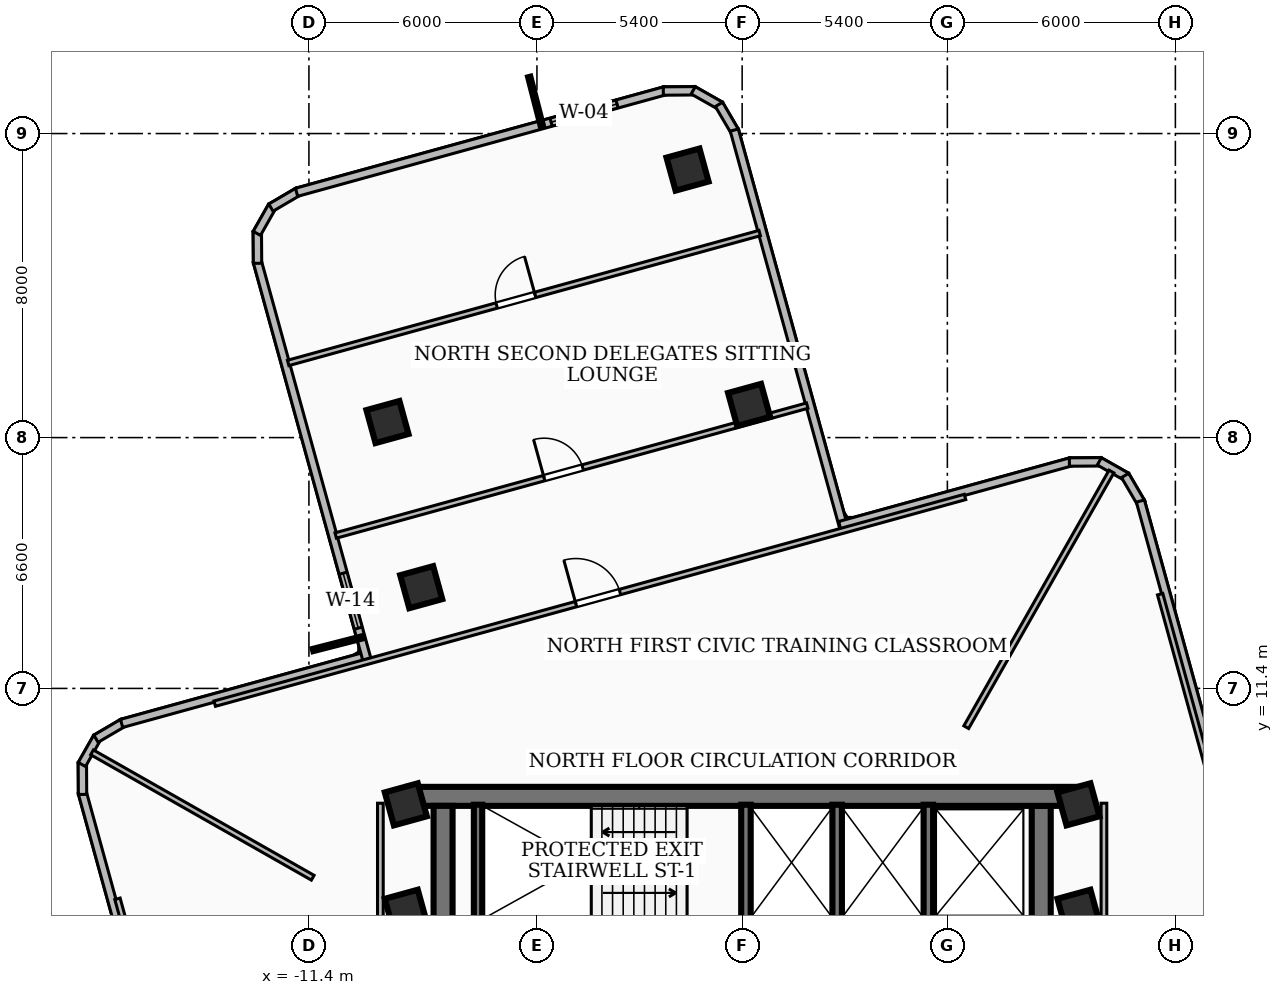
"""IFC4 building model, lengths in metres.
Left out: names, types, materials, properties, quantities, classifications, styles, units other than length and angle.
Written with IfcOpenShell. Run it as: python <this file> out.ifc"""

import sys

from ifc_helpers import new_model, si_unit, direction, frame, frame_2d, origin, origin_2d, place, context, subcontext, project, spatial, rectangle, extrude, element, fill, save


model = new_model("IFC4")
c1 = context("Model", 3, precision=1e-05, world=origin(), true_north=direction((0.0, 1.0)))
c2 = subcontext(c1, "Body", "Model", "MODEL_VIEW")
j1 = project(units=[si_unit("LENGTHUNIT", "METRE"), si_unit("PLANEANGLEUNIT", "RADIAN")], contexts=[c1])
p1 = place(None, origin())
s1 = spatial("IfcSite", under=j1, at=p1, CompositionType="ELEMENT")
p2 = place(p1, origin())
s2 = spatial("IfcBuilding", under=s1, at=p2, CompositionType="ELEMENT")
p3 = place(p2, frame((0.0, 0.0, 137.88)))
s3 = spatial("IfcBuildingStorey", under=s2, at=p3, CompositionType="ELEMENT", Elevation=137.88)
p4 = place(p3, frame((-8.78, 8.56, 0.0), z_axis=(0.0, 0.0, 1.0), x_axis=(1.0, 0.0, 0.0)))
e1 = element("IfcWall", 1, at=p4, inside=s3, PredefinedType="SHEAR", context=c2, shape_type="SweptSolid", body=[
    extrude(rectangle(XDim=17.56, YDim=0.5, at=frame_2d((8.78, 0.0))), origin(), (0.0, 0.0, 1.0), 3.32),
])
for number, where, z_axis, x_axis in (
    (2, (-7.87, 2.0, 0.0), (0.0, 0.0, 1.0), (0.0, 1.0, 0.0)),
    (3, (7.87, 8.31, 0.0), (0.0, 0.0, 1.0), (0.0, -1.0, 0.0)),
):
    element("IfcWall", number, at=place(p3, frame(where, z_axis=z_axis, x_axis=x_axis)), inside=s3, PredefinedType="SHEAR", context=c2, shape_type="SweptSolid", body=[
        extrude(rectangle(XDim=6.31, YDim=0.5, at=frame_2d((3.155, 0.0))), origin(), (0.0, 0.0, 1.0), 3.32),
    ])
p5 = place(p3, frame((-6.95, 5.28, 0.0), z_axis=(0.0, 0.0, 1.0), x_axis=(0.0, 1.0, 0.0)))
e4 = element("IfcWall", 4, at=p5, inside=s3, PredefinedType="SOLIDWALL", context=c2, shape_type="SweptSolid", body=[
    extrude(rectangle(XDim=3.06, YDim=0.22, at=frame_2d((1.53, 0.0))), origin(), (0.0, 0.0, 1.0), 3.32),
])
for number, where, z_axis, x_axis in (
    (5, (0.1, 5.3, 0.0), (0.0, 0.0, 1.0), (0.0, 1.0, 0.0)),
    (6, (2.5, 5.3, 0.0), (0.0, 0.0, 1.0), (0.0, 1.0, 0.0)),
    (7, (4.9, 5.3, 0.0), (0.0, 0.0, 1.0), (0.0, 1.0, 0.0)),
):
    element("IfcWall", number, at=place(p3, frame(where, z_axis=z_axis, x_axis=x_axis)), inside=s3, PredefinedType="SOLIDWALL", context=c2, shape_type="SweptSolid", body=[
        extrude(rectangle(XDim=3.04, YDim=0.25, at=frame_2d((1.52, 0.0))), origin(), (0.0, 0.0, 1.0), 3.32),
    ])
for number, where, z_axis, x_axis in (
    (8, (-8.85, 5.55, 0.0), (0.0, 0.0, 1.0), (0.964, 0.266, 0.0)),
    (9, (8.85, 5.55, 0.0), (0.0, 0.0, 1.0), (0.964, 0.266, 0.0)),
    (10, (-8.85, 8.35, 0.0), (0.0, 0.0, 1.0), (0.964, 0.266, 0.0)),
    (11, (8.85, 8.35, 0.0), (0.0, 0.0, 1.0), (0.964, 0.266, 0.0)),
    (12, (0.183, 18.86, 0.0), (0.0, 0.0, 1.0), (0.964, 0.266, 0.0)),
    (13, (-8.445, 14.064, 0.0), (0.0, 0.0, 1.0), (0.964, 0.266, 0.0)),
    (14, (-1.437, 25.052, 0.0), (0.0, 0.0, 1.0), (0.964, 0.266, 0.0)),
    (15, (-9.333, 18.409, 0.0), (0.0, 0.0, 1.0), (0.964, 0.266, 0.0)),
):
    element("IfcColumn", number, at=place(p3, frame(where, z_axis=z_axis, x_axis=x_axis)), inside=s3, PredefinedType="COLUMN", context=c2, shape_type="SweptSolid", body=[
        extrude(rectangle(XDim=0.9, YDim=0.9, at=origin_2d()), origin(), (0.0, 0.0, 1.0), 3.6),
    ])
p6 = place(p3, frame((-15.686, 2.568, 0.0), z_axis=(0.0, 0.0, 1.0), x_axis=(-0.265558779784, 0.964094670911, 0.0)))
e16 = element("IfcWall", 16, at=p6, inside=s3, PredefinedType="SOLIDWALL", context=c2, shape_type="SweptSolid", body=[
    extrude(rectangle(XDim=6.319, YDim=0.22, at=frame_2d((3.159, 0.0))), origin(), (0.0, 0.0, 1.0), 3.32),
])
p7 = place(p3, frame((-17.357, 8.611, 0.0), z_axis=(0.0, 0.0, 1.0), x_axis=(-0.006140235123, 0.999981148579, 0.0)))
e17 = element("IfcWall", 17, at=p7, inside=s3, PredefinedType="SOLIDWALL", context=c2, shape_type="SweptSolid", body=[
    extrude(rectangle(XDim=0.835, YDim=0.22, at=frame_2d((0.417, 0.0))), origin(), (0.0, 0.0, 1.0), 3.32),
])
p8 = place(p3, frame((-17.374, 9.399, 0.0), z_axis=(0.0, 0.0, 1.0), x_axis=(0.492959963164, 0.87005199541, 0.0)))
e18 = element("IfcWall", 18, at=p8, inside=s3, PredefinedType="SOLIDWALL", context=c2, shape_type="SweptSolid", body=[
    extrude(rectangle(XDim=0.82, YDim=0.22, at=frame_2d((0.41, 0.0))), origin(), (0.0, 0.0, 1.0), 3.32),
])
p9 = place(p3, frame((-17.004, 10.077, 0.0), z_axis=(0.0, 0.0, 1.0), x_axis=(0.862662761192, 0.505779557172, 0.0)))
e19 = element("IfcWall", 19, at=p9, inside=s3, PredefinedType="SOLIDWALL", context=c2, shape_type="SweptSolid", body=[
    extrude(rectangle(XDim=0.834, YDim=0.22, at=frame_2d((0.417, 0.0))), origin(), (0.0, 0.0, 1.0), 3.32),
])
p10 = place(p3, frame((-16.33, 10.479, 0.0), z_axis=(0.0, 0.0, 1.0), x_axis=(0.964092175021, 0.265567840793, 0.0)))
e20 = element("IfcWall", 20, at=p10, inside=s3, PredefinedType="SOLIDWALL", context=c2, shape_type="SweptSolid", body=[
    extrude(rectangle(XDim=6.759, YDim=0.22, at=frame_2d((3.379, 0.0))), origin(), (0.0, 0.0, 1.0), 3.32),
])
p11 = place(p3, frame((-9.876, 12.166, 0.0), z_axis=(0.0, 0.0, 1.0), x_axis=(-0.265506061674, 0.964109190504, 0.0)))
e21 = element("IfcWall", 21, at=p11, inside=s3, PredefinedType="SOLIDWALL", context=c2, shape_type="SweptSolid", body=[
    extrude(rectangle(XDim=10.859, YDim=0.22, at=frame_2d((5.429, 0.0))), origin(), (0.0, 0.0, 1.0), 3.32),
])
p12 = place(p11, frame((0.85, 0.0, 0.85)))
e22 = element("IfcOpeningElement", 22, at=p12, cuts=e21, PredefinedType="OPENING", context=c2, shape_type="SweptSolid", body=[
    extrude(rectangle(XDim=1.5, YDim=1.5, at=frame_2d((0.75, 0.75))), frame((0.0, 0.12, 0.0), z_axis=(0.0, -1.0, 0.0), x_axis=(1.0, 0.0, 0.0)), (0.0, 0.0, 1.0), 0.24),
])
p13 = place(p3, frame((-12.752, 22.586, 0.0), z_axis=(0.0, 0.0, 1.0), x_axis=(-0.007318305188, 0.999973220846, 0.0)))
e23 = element("IfcWall", 23, at=p13, inside=s3, PredefinedType="SOLIDWALL", context=c2, shape_type="SweptSolid", body=[
    extrude(rectangle(XDim=0.834, YDim=0.22, at=frame_2d((0.417, 0.0))), origin(), (0.0, 0.0, 1.0), 3.32),
])
p14 = place(p3, frame((-12.77, 23.373, 0.0), z_axis=(0.0, 0.0, 1.0), x_axis=(0.493087743786, 0.869979584202, 0.0)))
e24 = element("IfcWall", 24, at=p14, inside=s3, PredefinedType="SOLIDWALL", context=c2, shape_type="SweptSolid", body=[
    extrude(rectangle(XDim=0.819, YDim=0.22, at=frame_2d((0.41, 0.0))), origin(), (0.0, 0.0, 1.0), 3.32),
])
p15 = place(p3, frame((-12.4, 24.051, 0.0), z_axis=(0.0, 0.0, 1.0), x_axis=(0.862451814289, 0.506139178517, 0.0)))
e25 = element("IfcWall", 25, at=p15, inside=s3, PredefinedType="SOLIDWALL", context=c2, shape_type="SweptSolid", body=[
    extrude(rectangle(XDim=0.836, YDim=0.22, at=frame_2d((0.418, 0.0))), origin(), (0.0, 0.0, 1.0), 3.32),
])
p16 = place(p3, frame((-11.725, 24.454, 0.0), z_axis=(0.0, 0.0, 1.0), x_axis=(0.964088658865, 0.265580605181, 0.0)))
e26 = element("IfcWall", 26, at=p16, inside=s3, PredefinedType="SOLIDWALL", context=c2, shape_type="SweptSolid", body=[
    extrude(rectangle(XDim=10.061, YDim=0.22, at=frame_2d((5.03, 0.0))), origin(), (0.0, 0.0, 1.0), 3.32),
])
p17 = place(p16, frame((6.947, 0.0, 0.85)))
e27 = element("IfcOpeningElement", 27, at=p17, cuts=e26, PredefinedType="OPENING", context=c2, shape_type="SweptSolid", body=[
    extrude(rectangle(XDim=1.8, YDim=2.0, at=frame_2d((0.9, 1.0))), frame((0.0, 0.12, 0.0), z_axis=(0.0, -1.0, 0.0), x_axis=(1.0, 0.0, 0.0)), (0.0, 0.0, 1.0), 0.24),
])
p18 = place(p3, frame((-2.075, 27.119, 0.0), z_axis=(0.0, 0.0, 1.0), x_axis=(0.999973220846, 0.007318305188, 0.0)))
e28 = element("IfcWall", 28, at=p18, inside=s3, PredefinedType="SOLIDWALL", context=c2, shape_type="SweptSolid", body=[
    extrude(rectangle(XDim=0.834, YDim=0.22, at=frame_2d((0.417, 0.0))), origin(), (0.0, 0.0, 1.0), 3.32),
])
p19 = place(p3, frame((-1.288, 27.137, 0.0), z_axis=(0.0, 0.0, 1.0), x_axis=(0.87005199541, -0.492959963164, 0.0)))
e29 = element("IfcWall", 29, at=p19, inside=s3, PredefinedType="SOLIDWALL", context=c2, shape_type="SweptSolid", body=[
    extrude(rectangle(XDim=0.82, YDim=0.22, at=frame_2d((0.41, 0.0))), origin(), (0.0, 0.0, 1.0), 3.32),
])
p20 = place(p3, frame((-0.61, 26.767, 0.0), z_axis=(0.0, 0.0, 1.0), x_axis=(0.506011715077, -0.862526604926, 0.0)))
e30 = element("IfcWall", 30, at=p20, inside=s3, PredefinedType="SOLIDWALL", context=c2, shape_type="SweptSolid", body=[
    extrude(rectangle(XDim=0.836, YDim=0.22, at=frame_2d((0.418, 0.0))), origin(), (0.0, 0.0, 1.0), 3.32),
])
p21 = place(p3, frame((-0.207, 26.092, 0.0), z_axis=(0.0, 0.0, 1.0), x_axis=(0.265529084478, -0.964102849958, 0.0)))
e31 = element("IfcWall", 31, at=p21, inside=s3, PredefinedType="SOLIDWALL", context=c2, shape_type="SweptSolid", body=[
    extrude(rectangle(XDim=10.858, YDim=0.22, at=frame_2d((5.429, 0.0))), origin(), (0.0, 0.0, 1.0), 2.55),
])
p22 = place(p3, frame((2.568, 15.686, 0.0), z_axis=(0.0, 0.0, 1.0), x_axis=(0.964094670911, 0.265558779784, 0.0)))
e32 = element("IfcWall", 32, at=p22, inside=s3, PredefinedType="SOLIDWALL", context=c2, shape_type="SweptSolid", body=[
    extrude(rectangle(XDim=6.319, YDim=0.22, at=frame_2d((3.159, 0.0))), origin(), (0.0, 0.0, 1.0), 2.55),
])
p23 = place(p3, frame((8.611, 17.357, 0.0), z_axis=(0.0, 0.0, 1.0), x_axis=(0.999981148579, 0.006140235123, 0.0)))
e33 = element("IfcWall", 33, at=p23, inside=s3, PredefinedType="SOLIDWALL", context=c2, shape_type="SweptSolid", body=[
    extrude(rectangle(XDim=0.835, YDim=0.22, at=frame_2d((0.417, 0.0))), origin(), (0.0, 0.0, 1.0), 3.32),
])
p24 = place(p3, frame((9.399, 17.374, 0.0), z_axis=(0.0, 0.0, 1.0), x_axis=(0.87005199541, -0.492959963164, 0.0)))
e34 = element("IfcWall", 34, at=p24, inside=s3, PredefinedType="SOLIDWALL", context=c2, shape_type="SweptSolid", body=[
    extrude(rectangle(XDim=0.82, YDim=0.22, at=frame_2d((0.41, 0.0))), origin(), (0.0, 0.0, 1.0), 3.32),
])
p25 = place(p3, frame((10.077, 17.004, 0.0), z_axis=(0.0, 0.0, 1.0), x_axis=(0.505779557172, -0.862662761192, 0.0)))
e35 = element("IfcWall", 35, at=p25, inside=s3, PredefinedType="SOLIDWALL", context=c2, shape_type="SweptSolid", body=[
    extrude(rectangle(XDim=0.834, YDim=0.22, at=frame_2d((0.417, 0.0))), origin(), (0.0, 0.0, 1.0), 3.32),
])
p26 = place(p3, frame((10.479, 16.33, 0.0), z_axis=(0.0, 0.0, 1.0), x_axis=(0.265567840793, -0.964092175021, 0.0)))
e36 = element("IfcWall", 36, at=p26, inside=s3, PredefinedType="SOLIDWALL", context=c2, shape_type="SweptSolid", body=[
    extrude(rectangle(XDim=6.759, YDim=0.22, at=frame_2d((3.379, 0.0))), origin(), (0.0, 0.0, 1.0), 2.624),
])
p27 = place(p3, frame((12.166, 9.876, 0.0), z_axis=(0.0, 0.0, 1.0), x_axis=(0.964099811745, 0.2655401156, 0.0)))
e37 = element("IfcWall", 37, at=p27, inside=s3, PredefinedType="SOLIDWALL", context=c2, shape_type="SweptSolid", body=[
    extrude(rectangle(XDim=13.459, YDim=0.22, at=frame_2d((6.729, 0.0))), origin(), (0.0, 0.0, 1.0), 2.624),
])
for number, where, z_axis, x_axis in (
    (38, (-9.52, 1.75, 0.0), (0.0, 0.0, 1.0), (0.0, 1.0, 0.0)),
    (39, (9.52, 1.75, 0.0), (0.0, 0.0, 1.0), (0.0, 1.0, 0.0)),
):
    element("IfcWall", number, at=place(p3, frame(where, z_axis=z_axis, x_axis=x_axis)), inside=s3, PredefinedType="PARTITIONING", context=c2, shape_type="SweptSolid", body=[
        extrude(rectangle(XDim=6.63, YDim=0.15, at=frame_2d((3.315, 0.0))), origin(), (0.0, 0.0, 1.0), 2.55),
    ])
p28 = place(p3, frame((5.897, 10.38, 0.0), z_axis=(0.0, 0.0, 1.0), x_axis=(0.49389771586, 0.869520009125, 0.0)))
e40 = element("IfcWall", 40, at=p28, inside=s3, PredefinedType="PARTITIONING", context=c2, shape_type="SweptSolid", body=[
    extrude(rectangle(XDim=7.737, YDim=0.145, at=frame_2d((3.868, 0.0))), origin(), (0.0, 0.0, 1.0), 2.55),
])
p29 = place(p3, frame((-11.3, 6.419, 0.0), z_axis=(0.0, 0.0, 1.0), x_axis=(-0.869475469758, 0.493976120363, 0.0)))
e41 = element("IfcWall", 41, at=p29, inside=s3, PredefinedType="PARTITIONING", context=c2, shape_type="SweptSolid", body=[
    extrude(rectangle(XDim=6.679, YDim=0.145, at=frame_2d((3.339, 0.0))), origin(), (0.0, 0.0, 1.0), 3.32),
])
p30 = place(p3, frame((10.999, 13.879, 0.0), z_axis=(0.0, 0.0, 1.0), x_axis=(0.26558288107, -0.964088031915, 0.0)))
e42 = element("IfcWall", 42, at=p30, inside=s3, PredefinedType="PARTITIONING", context=c2, shape_type="SweptSolid", body=[
    extrude(rectangle(XDim=20.479, YDim=0.145, at=frame_2d((10.24, 0.0))), origin(), (0.0, 0.0, 1.0), 2.55),
])
p31 = place(p30, frame((9.86, 0.0, 0.0)))
e43 = element("IfcOpeningElement", 43, at=p31, cuts=e42, PredefinedType="OPENING", context=c2, shape_type="SweptSolid", body=[
    extrude(rectangle(XDim=1.2, YDim=2.1, at=frame_2d((0.6, 1.05))), frame((0.0, 0.083, 0.0), z_axis=(0.0, -1.0, 0.0), x_axis=(1.0, 0.0, 0.0)), (0.0, 0.0, 1.0), 0.165),
])
p32 = place(p3, frame((-13.879, 10.999, 0.0), z_axis=(0.0, 0.0, 1.0), x_axis=(0.964088031915, 0.26558288107, 0.0)))
e44 = element("IfcWall", 44, at=p32, inside=s3, PredefinedType="PARTITIONING", context=c2, shape_type="SweptSolid", body=[
    extrude(rectangle(XDim=20.479, YDim=0.145, at=frame_2d((10.24, 0.0))), origin(), (0.0, 0.0, 1.0), 2.55),
])
p33 = place(p32, frame((9.86, 0.0, 0.0)))
e45 = element("IfcOpeningElement", 45, at=p33, cuts=e44, PredefinedType="OPENING", context=c2, shape_type="SweptSolid", body=[
    extrude(rectangle(XDim=1.2, YDim=2.1, at=frame_2d((0.6, 1.05))), frame((0.0, 0.083, 0.0), z_axis=(0.0, -1.0, 0.0), x_axis=(1.0, 0.0, 0.0)), (0.0, 0.0, 1.0), 0.165),
])
p34 = place(p3, frame((-10.695, 15.423, 0.0), z_axis=(0.0, 0.0, 1.0), x_axis=(0.96409048194, 0.265573987115, 0.0)))
e46 = element("IfcWall", 46, at=p34, inside=s3, PredefinedType="PARTITIONING", context=c2, shape_type="SweptSolid", body=[
    extrude(rectangle(XDim=12.87, YDim=0.145, at=frame_2d((6.435, 0.0))), origin(), (0.0, 0.0, 1.0), 2.55),
])
p35 = place(p34, frame((5.69, 0.0, 0.0)))
e47 = element("IfcOpeningElement", 47, at=p35, cuts=e46, PredefinedType="OPENING", context=c2, shape_type="SweptSolid", body=[
    extrude(rectangle(XDim=1.05, YDim=2.08, at=frame_2d((0.525, 1.04))), frame((0.0, 0.083, 0.0), z_axis=(0.0, -1.0, 0.0), x_axis=(1.0, 0.0, 0.0)), (0.0, 0.0, 1.0), 0.165),
])
p36 = place(p3, frame((-11.946, 19.964, 0.0), z_axis=(0.0, 0.0, 1.0), x_axis=(0.96409048194, 0.265573987115, 0.0)))
e48 = element("IfcWall", 48, at=p36, inside=s3, PredefinedType="PARTITIONING", context=c2, shape_type="SweptSolid", body=[
    extrude(rectangle(XDim=12.87, YDim=0.145, at=frame_2d((6.435, 0.0))), origin(), (0.0, 0.0, 1.0), 2.55),
])
p37 = place(p36, frame((5.69, 0.0, 0.0)))
e49 = element("IfcOpeningElement", 49, at=p37, cuts=e48, PredefinedType="OPENING", context=c2, shape_type="SweptSolid", body=[
    extrude(rectangle(XDim=1.05, YDim=2.08, at=frame_2d((0.525, 1.04))), frame((0.0, 0.083, 0.0), z_axis=(0.0, -1.0, 0.0), x_axis=(1.0, 0.0, 0.0)), (0.0, 0.0, 1.0), 0.165),
])
p38 = place(p3, frame((-10.999, -13.879, 0.0), z_axis=(0.0, 0.0, 1.0), x_axis=(-0.26558288107, 0.964088031915, 0.0)))
e50 = element("IfcWall", 50, at=p38, inside=s3, PredefinedType="PARTITIONING", context=c2, shape_type="SweptSolid", body=[
    extrude(rectangle(XDim=20.479, YDim=0.145, at=frame_2d((10.24, 0.0))), origin(), (0.0, 0.0, 1.0), 2.55),
])
p39 = place(p38, frame((9.86, 0.0, 0.0)))
e51 = element("IfcOpeningElement", 51, at=p39, cuts=e50, PredefinedType="OPENING", context=c2, shape_type="SweptSolid", body=[
    extrude(rectangle(XDim=1.2, YDim=2.1, at=frame_2d((0.6, 1.05))), frame((0.0, 0.083, 0.0), z_axis=(0.0, -1.0, 0.0), x_axis=(1.0, 0.0, 0.0)), (0.0, 0.0, 1.0), 0.165),
])
p40 = place(p12, origin())
e52 = element("IfcWindow", 52, at=p40, inside=s3, PartitioningType="SINGLE_PANEL", PredefinedType="WINDOW", context=c2, shape_type="SweptSolid", body=[
    extrude(rectangle(XDim=1.5, YDim=1.5, at=frame_2d((0.75, 0.75))), frame((0.0, 0.03, 0.0), z_axis=(0.0, -1.0, 0.0), x_axis=(1.0, 0.0, 0.0)), (0.0, 0.0, 1.0), 0.06),
])
fill(e22, e52)
p41 = place(p17, origin())
e53 = element("IfcWindow", 53, at=p41, inside=s3, PartitioningType="SINGLE_PANEL", PredefinedType="WINDOW", context=c2, shape_type="SweptSolid", body=[
    extrude(rectangle(XDim=1.8, YDim=2.0, at=frame_2d((0.9, 1.0))), frame((0.0, 0.03, 0.0), z_axis=(0.0, -1.0, 0.0), x_axis=(1.0, 0.0, 0.0)), (0.0, 0.0, 1.0), 0.06),
])
fill(e27, e53)
p42 = place(p33, origin())
e54 = element("IfcDoor", 54, at=p42, inside=s3, OperationType="SINGLE_SWING_LEFT", PredefinedType="DOOR", context=c2, shape_type="SweptSolid", body=[
    extrude(rectangle(XDim=1.2, YDim=2.1, at=frame_2d((0.6, 1.05))), frame((0.0, 0.025, 0.0), z_axis=(0.0, -1.0, 0.0), x_axis=(1.0, 0.0, 0.0)), (0.0, 0.0, 1.0), 0.05),
])
fill(e45, e54)
p43 = place(p35, origin())
e55 = element("IfcDoor", 55, at=p43, inside=s3, OperationType="SINGLE_SWING_LEFT", PredefinedType="DOOR", context=c2, shape_type="SweptSolid", body=[
    extrude(rectangle(XDim=1.05, YDim=2.08, at=frame_2d((0.525, 1.04))), frame((0.0, 0.025, 0.0), z_axis=(0.0, -1.0, 0.0), x_axis=(1.0, 0.0, 0.0)), (0.0, 0.0, 1.0), 0.05),
])
fill(e47, e55)
p44 = place(p37, origin())
e56 = element("IfcDoor", 56, at=p44, inside=s3, OperationType="SINGLE_SWING_RIGHT", PredefinedType="DOOR", context=c2, shape_type="SweptSolid", body=[
    extrude(rectangle(XDim=1.05, YDim=2.08, at=frame_2d((0.525, 1.04))), frame((0.0, 0.025, 0.0), z_axis=(0.0, -1.0, 0.0), x_axis=(1.0, 0.0, 0.0)), (0.0, 0.0, 1.0), 0.05),
])
fill(e49, e56)
save(model, sys.argv[1])
